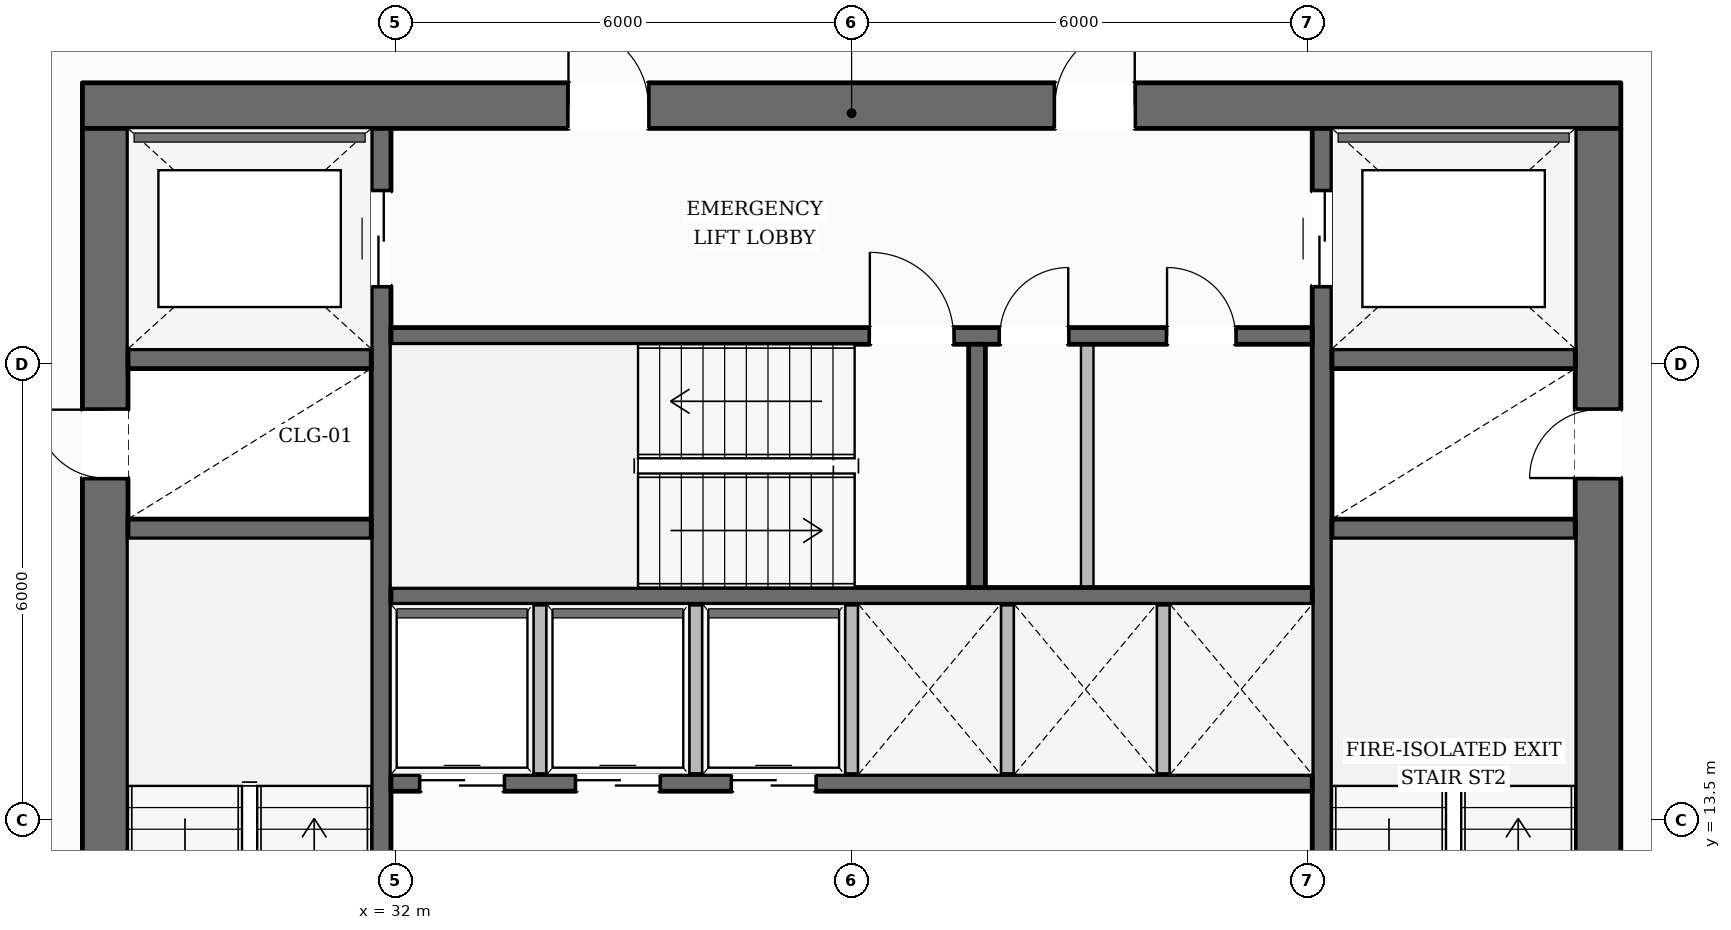
"""IFC4 building model, lengths in metres.
Left out: names, types, materials, properties, quantities, classifications, styles, units other than length and angle.
Written with IfcOpenShell. Run it as: python <this file> out.ifc"""

import sys

from ifc_helpers import new_model, si_unit, direction, frame, frame_2d, origin, place, context, subcontext, project, spatial, rectangle, extrude, element, fill, save


model = new_model("IFC4")
c1 = context("Model", 3, precision=1e-05, world=origin(), true_north=direction((0.0, 1.0)))
c2 = subcontext(c1, "Body", "Model", "MODEL_VIEW")
j1 = project(units=[si_unit("LENGTHUNIT", "METRE"), si_unit("PLANEANGLEUNIT", "RADIAN")], contexts=[c1])
p1 = place(None, origin())
s1 = spatial("IfcSite", under=j1, at=p1, CompositionType="ELEMENT")
p2 = place(p1, origin())
s2 = spatial("IfcBuilding", under=s1, at=p2, CompositionType="ELEMENT")
p3 = place(p2, frame((0.0, 0.0, 67.6)))
s3 = spatial("IfcBuildingStorey", under=s2, at=p3, CompositionType="ELEMENT", Elevation=67.6)
p4 = place(p3, frame((27.88, 22.9, 0.0), z_axis=(0.0, 0.0, 1.0), x_axis=(1.0, 0.0, 0.0)))
e1 = element("IfcWall", 1, at=p4, inside=s3, PredefinedType="SOLIDWALL", context=c2, shape_type="SweptSolid", body=[
    extrude(rectangle(XDim=20.24, YDim=0.6, at=frame_2d((10.12, 0.0))), origin(), (0.0, 0.0, 1.0), 3.59),
])
p5 = place(p4, frame((6.395, 0.0, 0.0)))
e2 = element("IfcOpeningElement", 2, at=p5, cuts=e1, PredefinedType="OPENING", context=c2, shape_type="SweptSolid", body=[
    extrude(rectangle(XDim=1.05, YDim=2.15, at=frame_2d((0.525, 1.075))), frame((0.0, 0.31, 0.0), z_axis=(0.0, -1.0, 0.0), x_axis=(1.0, 0.0, 0.0)), (0.0, 0.0, 1.0), 0.62),
])
p6 = place(p4, frame((12.795, 0.0, 0.0)))
e3 = element("IfcOpeningElement", 3, at=p6, cuts=e1, PredefinedType="OPENING", context=c2, shape_type="SweptSolid", body=[
    extrude(rectangle(XDim=1.05, YDim=2.15, at=frame_2d((0.525, 1.075))), frame((0.0, 0.31, 0.0), z_axis=(0.0, -1.0, 0.0), x_axis=(1.0, 0.0, 0.0)), (0.0, 0.0, 1.0), 0.62),
])
p7 = place(p3, frame((28.18, 9.6, 0.0), z_axis=(0.0, 0.0, 1.0), x_axis=(0.0, 1.0, 0.0)))
e4 = element("IfcWall", 4, at=p7, inside=s3, PredefinedType="SOLIDWALL", context=c2, shape_type="SweptSolid", body=[
    extrude(rectangle(XDim=13.0, YDim=0.6, at=frame_2d((6.5, 0.0))), origin(), (0.0, 0.0, 1.0), 3.59),
])
p8 = place(p7, frame((0.2, 0.0, 0.0)))
e5 = element("IfcOpeningElement", 5, at=p8, cuts=e4, PredefinedType="OPENING", context=c2, shape_type="SweptSolid", body=[
    extrude(rectangle(XDim=1.1, YDim=2.15, at=frame_2d((0.55, 1.075))), frame((0.0, 0.31, 0.0), z_axis=(0.0, -1.0, 0.0), x_axis=(1.0, 0.0, 0.0)), (0.0, 0.0, 1.0), 0.62),
])
p9 = place(p7, frame((8.4, 0.0, 0.0)))
e6 = element("IfcOpeningElement", 6, at=p9, cuts=e4, PredefinedType="OPENING", context=c2, shape_type="SweptSolid", body=[
    extrude(rectangle(XDim=0.9, YDim=2.1, at=frame_2d((0.45, 1.05))), frame((0.0, 0.31, 0.0), z_axis=(0.0, -1.0, 0.0), x_axis=(1.0, 0.0, 0.0)), (0.0, 0.0, 1.0), 0.62),
])
p10 = place(p3, frame((47.82, 9.6, 0.0), z_axis=(0.0, 0.0, 1.0), x_axis=(0.0, 1.0, 0.0)))
e7 = element("IfcWall", 7, at=p10, inside=s3, PredefinedType="SOLIDWALL", context=c2, shape_type="SweptSolid", body=[
    extrude(rectangle(XDim=13.0, YDim=0.6, at=frame_2d((6.5, 0.0))), origin(), (0.0, 0.0, 1.0), 3.59),
])
p11 = place(p10, frame((0.2, 0.0, 0.0)))
e8 = element("IfcOpeningElement", 8, at=p11, cuts=e7, PredefinedType="OPENING", context=c2, shape_type="SweptSolid", body=[
    extrude(rectangle(XDim=1.1, YDim=2.15, at=frame_2d((0.55, 1.075))), frame((0.0, 0.31, 0.0), z_axis=(0.0, -1.0, 0.0), x_axis=(1.0, 0.0, 0.0)), (0.0, 0.0, 1.0), 0.62),
])
p12 = place(p10, frame((8.4, 0.0, 0.0)))
e9 = element("IfcOpeningElement", 9, at=p12, cuts=e7, PredefinedType="OPENING", context=c2, shape_type="SweptSolid", body=[
    extrude(rectangle(XDim=0.9, YDim=2.1, at=frame_2d((0.45, 1.05))), frame((0.0, 0.31, 0.0), z_axis=(0.0, -1.0, 0.0), x_axis=(1.0, 0.0, 0.0)), (0.0, 0.0, 1.0), 0.62),
])
p13 = place(p3, frame((31.81, 9.6, 0.0), z_axis=(0.0, 0.0, 1.0), x_axis=(0.0, 1.0, 0.0)))
e10 = element("IfcWall", 10, at=p13, inside=s3, PredefinedType="SHEAR", context=c2, shape_type="SweptSolid", body=[
    extrude(rectangle(XDim=13.0, YDim=0.26, at=frame_2d((6.5, 0.0))), origin(), (0.0, 0.0, 1.0), 3.59),
])
p14 = place(p13, frame((10.925, 0.0, 0.0)))
e11 = element("IfcOpeningElement", 11, at=p14, cuts=e10, PredefinedType="OPENING", context=c2, shape_type="SweptSolid", body=[
    extrude(rectangle(XDim=1.25, YDim=2.25, at=frame_2d((0.625, 1.125))), frame((0.0, 0.14, 0.0), z_axis=(0.0, -1.0, 0.0), x_axis=(1.0, 0.0, 0.0)), (0.0, 0.0, 1.0), 0.28),
])
p15 = place(p3, frame((44.19, 9.6, 0.0), z_axis=(0.0, 0.0, 1.0), x_axis=(0.0, 1.0, 0.0)))
e12 = element("IfcWall", 12, at=p15, inside=s3, PredefinedType="SHEAR", context=c2, shape_type="SweptSolid", body=[
    extrude(rectangle(XDim=13.0, YDim=0.26, at=frame_2d((6.5, 0.0))), origin(), (0.0, 0.0, 1.0), 3.59),
])
p16 = place(p15, frame((10.925, 0.0, 0.0)))
e13 = element("IfcOpeningElement", 13, at=p16, cuts=e12, PredefinedType="OPENING", context=c2, shape_type="SweptSolid", body=[
    extrude(rectangle(XDim=1.25, YDim=2.25, at=frame_2d((0.625, 1.125))), frame((0.0, 0.14, 0.0), z_axis=(0.0, -1.0, 0.0), x_axis=(1.0, 0.0, 0.0)), (0.0, 0.0, 1.0), 0.28),
])
for number, where, z_axis, x_axis in (
    (14, (28.48, 17.33, 0.0), (0.0, 0.0, 1.0), (1.0, 0.0, 0.0)),
    (15, (28.48, 19.57, 0.0), (0.0, 0.0, 1.0), (1.0, 0.0, 0.0)),
    (16, (44.32, 17.33, 0.0), (0.0, 0.0, 1.0), (1.0, 0.0, 0.0)),
    (17, (44.32, 19.57, 0.0), (0.0, 0.0, 1.0), (1.0, 0.0, 0.0)),
):
    element("IfcWall", number, at=place(p3, frame(where, z_axis=z_axis, x_axis=x_axis)), inside=s3, PredefinedType="SHEAR", context=c2, shape_type="SweptSolid", body=[
        extrude(rectangle(XDim=3.2, YDim=0.26, at=frame_2d((1.6, 0.0))), origin(), (0.0, 0.0, 1.0), 3.59),
    ])
p17 = place(p3, frame((31.94, 19.87, 0.0), z_axis=(0.0, 0.0, 1.0), x_axis=(1.0, 0.0, 0.0)))
e18 = element("IfcWall", 18, at=p17, inside=s3, PredefinedType="SOLIDWALL", context=c2, shape_type="SweptSolid", body=[
    extrude(rectangle(XDim=12.12, YDim=0.22, at=frame_2d((6.06, 0.0))), origin(), (0.0, 0.0, 1.0), 3.59),
])
p18 = place(p17, frame((6.3, 0.0, 0.0)))
e19 = element("IfcOpeningElement", 19, at=p18, cuts=e18, PredefinedType="OPENING", context=c2, shape_type="SweptSolid", body=[
    extrude(rectangle(XDim=1.1, YDim=2.15, at=frame_2d((0.55, 1.075))), frame((0.0, 0.12, 0.0), z_axis=(0.0, -1.0, 0.0), x_axis=(1.0, 0.0, 0.0)), (0.0, 0.0, 1.0), 0.24),
])
p19 = place(p17, frame((8.01, 0.0, 0.0)))
e20 = element("IfcOpeningElement", 20, at=p19, cuts=e18, PredefinedType="OPENING", context=c2, shape_type="SweptSolid", body=[
    extrude(rectangle(XDim=0.9, YDim=2.1, at=frame_2d((0.45, 1.05))), frame((0.0, 0.12, 0.0), z_axis=(0.0, -1.0, 0.0), x_axis=(1.0, 0.0, 0.0)), (0.0, 0.0, 1.0), 0.24),
])
p20 = place(p17, frame((10.21, 0.0, 0.0)))
e21 = element("IfcOpeningElement", 21, at=p20, cuts=e18, PredefinedType="OPENING", context=c2, shape_type="SweptSolid", body=[
    extrude(rectangle(XDim=0.9, YDim=2.1, at=frame_2d((0.45, 1.05))), frame((0.0, 0.12, 0.0), z_axis=(0.0, -1.0, 0.0), x_axis=(1.0, 0.0, 0.0)), (0.0, 0.0, 1.0), 0.24),
])
p21 = place(p3, frame((31.94, 16.45, 0.0), z_axis=(0.0, 0.0, 1.0), x_axis=(1.0, 0.0, 0.0)))
e22 = element("IfcWall", 22, at=p21, inside=s3, PredefinedType="SOLIDWALL", context=c2, shape_type="SweptSolid", body=[
    extrude(rectangle(XDim=12.12, YDim=0.22, at=frame_2d((6.06, 0.0))), origin(), (0.0, 0.0, 1.0), 3.59),
])
p22 = place(p3, frame((39.65, 16.56, 0.0), z_axis=(0.0, 0.0, 1.0), x_axis=(0.0, 1.0, 0.0)))
e23 = element("IfcWall", 23, at=p22, inside=s3, PredefinedType="SOLIDWALL", context=c2, shape_type="SweptSolid", body=[
    extrude(rectangle(XDim=3.2, YDim=0.22, at=frame_2d((1.6, 0.0))), origin(), (0.0, 0.0, 1.0), 3.59),
])
p23 = place(p3, frame((31.94, 13.99, 0.0), z_axis=(0.0, 0.0, 1.0), x_axis=(1.0, 0.0, 0.0)))
e24 = element("IfcWall", 24, at=p23, inside=s3, PredefinedType="SOLIDWALL", context=c2, shape_type="SweptSolid", body=[
    extrude(rectangle(XDim=12.12, YDim=0.22, at=frame_2d((6.06, 0.0))), origin(), (0.0, 0.0, 1.0), 3.59),
])
p24 = place(p23, frame((0.385, 0.0, 0.0)))
e25 = element("IfcOpeningElement", 25, at=p24, cuts=e24, PredefinedType="OPENING", context=c2, shape_type="SweptSolid", body=[
    extrude(rectangle(XDim=1.1, YDim=2.2, at=frame_2d((0.55, 1.1))), frame((0.0, 0.12, 0.0), z_axis=(0.0, -1.0, 0.0), x_axis=(1.0, 0.0, 0.0)), (0.0, 0.0, 1.0), 0.24),
])
p25 = place(p23, frame((2.435, 0.0, 0.0)))
e26 = element("IfcOpeningElement", 26, at=p25, cuts=e24, PredefinedType="OPENING", context=c2, shape_type="SweptSolid", body=[
    extrude(rectangle(XDim=1.1, YDim=2.2, at=frame_2d((0.55, 1.1))), frame((0.0, 0.12, 0.0), z_axis=(0.0, -1.0, 0.0), x_axis=(1.0, 0.0, 0.0)), (0.0, 0.0, 1.0), 0.24),
])
p26 = place(p23, frame((4.485, 0.0, 0.0)))
e27 = element("IfcOpeningElement", 27, at=p26, cuts=e24, PredefinedType="OPENING", context=c2, shape_type="SweptSolid", body=[
    extrude(rectangle(XDim=1.1, YDim=2.2, at=frame_2d((0.55, 1.1))), frame((0.0, 0.12, 0.0), z_axis=(0.0, -1.0, 0.0), x_axis=(1.0, 0.0, 0.0)), (0.0, 0.0, 1.0), 0.24),
])
p27 = place(p3, frame((12.513, 13.357, 0.0), z_axis=(0.0, 0.0, 1.0), x_axis=(0.505335851503, 0.862922752734, 0.0)))
e28 = element("IfcWall", 28, at=p27, inside=s3, PredefinedType="STANDARD", context=c2, shape_type="SweptSolid", body=[
    extrude(rectangle(XDim=36.293, YDim=0.38, at=frame_2d((18.147, 0.0))), origin(), (0.0, 0.0, 1.0), 2.97),
])
p28 = place(p27, frame((32.05, 0.0, 0.65)))
e29 = element("IfcOpeningElement", 29, at=p28, cuts=e28, PredefinedType="OPENING", context=c2, shape_type="SweptSolid", body=[
    extrude(rectangle(XDim=1.65, YDim=1.75, at=frame_2d((0.825, 0.875))), frame((0.0, 0.2, 0.0), z_axis=(0.0, -1.0, 0.0), x_axis=(1.0, 0.0, 0.0)), (0.0, 0.0, 1.0), 0.4),
])
p29 = place(p27, frame((26.159, 0.0, 0.65)))
e30 = element("IfcOpeningElement", 30, at=p29, cuts=e28, PredefinedType="OPENING", context=c2, shape_type="SweptSolid", body=[
    extrude(rectangle(XDim=1.65, YDim=1.75, at=frame_2d((0.825, 0.875))), frame((0.0, 0.2, 0.0), z_axis=(0.0, -1.0, 0.0), x_axis=(1.0, 0.0, 0.0)), (0.0, 0.0, 1.0), 0.4),
])
p30 = place(p27, frame((8.49, 0.0, 0.65)))
e31 = element("IfcOpeningElement", 31, at=p30, cuts=e28, PredefinedType="OPENING", context=c2, shape_type="SweptSolid", body=[
    extrude(rectangle(XDim=1.65, YDim=1.75, at=frame_2d((0.825, 0.875))), frame((0.0, 0.2, 0.0), z_axis=(0.0, -1.0, 0.0), x_axis=(1.0, 0.0, 0.0)), (0.0, 0.0, 1.0), 0.4),
])
p31 = place(p27, frame((2.6, 0.0, 0.65)))
e32 = element("IfcOpeningElement", 32, at=p31, cuts=e28, PredefinedType="OPENING", context=c2, shape_type="SweptSolid", body=[
    extrude(rectangle(XDim=1.65, YDim=1.75, at=frame_2d((0.825, 0.875))), frame((0.0, 0.2, 0.0), z_axis=(0.0, -1.0, 0.0), x_axis=(1.0, 0.0, 0.0)), (0.0, 0.0, 1.0), 0.4),
])
p32 = place(p3, frame((45.032, 44.743, 0.0), z_axis=(0.0, 0.0, 1.0), x_axis=(0.501444024373, -0.865190089183, 0.0)))
e33 = element("IfcWall", 33, at=p32, inside=s3, PredefinedType="STANDARD", context=c2, shape_type="SweptSolid", body=[
    extrude(rectangle(XDim=36.012, YDim=0.38, at=frame_2d((18.006, 0.0))), origin(), (0.0, 0.0, 1.0), 2.97),
])
p33 = place(p32, frame((31.786, 0.0, 0.65)))
e34 = element("IfcOpeningElement", 34, at=p33, cuts=e33, PredefinedType="OPENING", context=c2, shape_type="SweptSolid", body=[
    extrude(rectangle(XDim=1.65, YDim=1.75, at=frame_2d((0.825, 0.875))), frame((0.0, 0.2, 0.0), z_axis=(0.0, -1.0, 0.0), x_axis=(1.0, 0.0, 0.0)), (0.0, 0.0, 1.0), 0.4),
])
p34 = place(p32, frame((25.944, 0.0, 0.65)))
e35 = element("IfcOpeningElement", 35, at=p34, cuts=e33, PredefinedType="OPENING", context=c2, shape_type="SweptSolid", body=[
    extrude(rectangle(XDim=1.65, YDim=1.75, at=frame_2d((0.825, 0.875))), frame((0.0, 0.2, 0.0), z_axis=(0.0, -1.0, 0.0), x_axis=(1.0, 0.0, 0.0)), (0.0, 0.0, 1.0), 0.4),
])
p35 = place(p32, frame((14.259, 0.0, 0.65)))
e36 = element("IfcOpeningElement", 36, at=p35, cuts=e33, PredefinedType="OPENING", context=c2, shape_type="SweptSolid", body=[
    extrude(rectangle(XDim=1.65, YDim=1.75, at=frame_2d((0.825, 0.875))), frame((0.0, 0.2, 0.0), z_axis=(0.0, -1.0, 0.0), x_axis=(1.0, 0.0, 0.0)), (0.0, 0.0, 1.0), 0.4),
])
p36 = place(p32, frame((8.417, 0.0, 0.65)))
e37 = element("IfcOpeningElement", 37, at=p36, cuts=e33, PredefinedType="OPENING", context=c2, shape_type="SweptSolid", body=[
    extrude(rectangle(XDim=1.65, YDim=1.75, at=frame_2d((0.825, 0.875))), frame((0.0, 0.2, 0.0), z_axis=(0.0, -1.0, 0.0), x_axis=(1.0, 0.0, 0.0)), (0.0, 0.0, 1.0), 0.4),
])
p37 = place(p32, frame((2.574, 0.0, 0.65)))
e38 = element("IfcOpeningElement", 38, at=p37, cuts=e33, PredefinedType="OPENING", context=c2, shape_type="SweptSolid", body=[
    extrude(rectangle(XDim=1.65, YDim=1.75, at=frame_2d((0.825, 0.875))), frame((0.0, 0.2, 0.0), z_axis=(0.0, -1.0, 0.0), x_axis=(1.0, 0.0, 0.0)), (0.0, 0.0, 1.0), 0.4),
])
for number, where, z_axis, x_axis in (
    (39, (33.9, 14.1, 0.0), (0.0, 0.0, 1.0), (0.0, 1.0, 0.0)),
    (40, (35.95, 14.1, 0.0), (0.0, 0.0, 1.0), (0.0, 1.0, 0.0)),
    (41, (38.0, 14.1, 0.0), (0.0, 0.0, 1.0), (0.0, 1.0, 0.0)),
    (42, (40.05, 14.1, 0.0), (0.0, 0.0, 1.0), (0.0, 1.0, 0.0)),
    (43, (42.1, 14.1, 0.0), (0.0, 0.0, 1.0), (0.0, 1.0, 0.0)),
):
    element("IfcWall", number, at=place(p3, frame(where, z_axis=z_axis, x_axis=x_axis)), inside=s3, PredefinedType="PARTITIONING", context=c2, shape_type="SweptSolid", body=[
        extrude(rectangle(XDim=2.24, YDim=0.165, at=frame_2d((1.12, 0.0))), origin(), (0.0, 0.0, 1.0), 3.59),
    ])
p38 = place(p3, frame((41.1, 16.56, 0.0), z_axis=(0.0, 0.0, 1.0), x_axis=(0.0, 1.0, 0.0)))
e44 = element("IfcWall", 44, at=p38, inside=s3, PredefinedType="PARTITIONING", context=c2, shape_type="SweptSolid", body=[
    extrude(rectangle(XDim=3.2, YDim=0.165, at=frame_2d((1.6, 0.0))), origin(), (0.0, 0.0, 1.0), 3.59),
])
p39 = place(p18, origin())
e45 = element("IfcDoor", 45, at=p39, inside=s3, OperationType="SINGLE_SWING_LEFT", PredefinedType="DOOR", context=c2, shape_type="SweptSolid", body=[
    extrude(rectangle(XDim=1.1, YDim=2.15, at=frame_2d((0.55, 1.075))), frame((0.0, 0.025, 0.0), z_axis=(0.0, -1.0, 0.0), x_axis=(1.0, 0.0, 0.0)), (0.0, 0.0, 1.0), 0.05),
])
fill(e19, e45)
p40 = place(p9, origin())
e46 = element("IfcDoor", 46, at=p40, inside=s3, OperationType="SINGLE_SWING_RIGHT", PredefinedType="DOOR", context=c2, shape_type="SweptSolid", body=[
    extrude(rectangle(XDim=0.9, YDim=2.1, at=frame_2d((0.45, 1.05))), frame((0.0, 0.025, 0.0), z_axis=(0.0, -1.0, 0.0), x_axis=(1.0, 0.0, 0.0)), (0.0, 0.0, 1.0), 0.05),
])
fill(e6, e46)
p41 = place(p12, origin())
e47 = element("IfcDoor", 47, at=p41, inside=s3, OperationType="SINGLE_SWING_LEFT", PredefinedType="DOOR", context=c2, shape_type="SweptSolid", body=[
    extrude(rectangle(XDim=0.9, YDim=2.1, at=frame_2d((0.45, 1.05))), frame((0.0, 0.025, 0.0), z_axis=(0.0, -1.0, 0.0), x_axis=(1.0, 0.0, 0.0)), (0.0, 0.0, 1.0), 0.05),
])
fill(e9, e47)
p42 = place(p5, origin())
e48 = element("IfcDoor", 48, at=p42, inside=s3, OperationType="SINGLE_SWING_LEFT", PredefinedType="DOOR", context=c2, shape_type="SweptSolid", body=[
    extrude(rectangle(XDim=1.05, YDim=2.15, at=frame_2d((0.525, 1.075))), frame((0.0, 0.025, 0.0), z_axis=(0.0, -1.0, 0.0), x_axis=(1.0, 0.0, 0.0)), (0.0, 0.0, 1.0), 0.05),
])
fill(e2, e48)
p43 = place(p6, origin())
e49 = element("IfcDoor", 49, at=p43, inside=s3, OperationType="SINGLE_SWING_RIGHT", PredefinedType="DOOR", context=c2, shape_type="SweptSolid", body=[
    extrude(rectangle(XDim=1.05, YDim=2.15, at=frame_2d((0.525, 1.075))), frame((0.0, 0.025, 0.0), z_axis=(0.0, -1.0, 0.0), x_axis=(1.0, 0.0, 0.0)), (0.0, 0.0, 1.0), 0.05),
])
fill(e3, e49)
p44 = place(p14, origin())
e50 = element("IfcDoor", 50, at=p44, inside=s3, OperationType="DOUBLE_DOOR_SLIDING", PredefinedType="DOOR", context=c2, shape_type="SweptSolid", body=[
    extrude(rectangle(XDim=1.25, YDim=2.25, at=frame_2d((0.625, 1.125))), frame((0.0, 0.025, 0.0), z_axis=(0.0, -1.0, 0.0), x_axis=(1.0, 0.0, 0.0)), (0.0, 0.0, 1.0), 0.05),
])
fill(e11, e50)
p45 = place(p16, origin())
e51 = element("IfcDoor", 51, at=p45, inside=s3, OperationType="DOUBLE_DOOR_SLIDING", PredefinedType="DOOR", context=c2, shape_type="SweptSolid", body=[
    extrude(rectangle(XDim=1.25, YDim=2.25, at=frame_2d((0.625, 1.125))), frame((0.0, 0.025, 0.0), z_axis=(0.0, -1.0, 0.0), x_axis=(1.0, 0.0, 0.0)), (0.0, 0.0, 1.0), 0.05),
])
fill(e13, e51)
p46 = place(p24, origin())
e52 = element("IfcDoor", 52, at=p46, inside=s3, OperationType="DOUBLE_DOOR_SLIDING", PredefinedType="DOOR", context=c2, shape_type="SweptSolid", body=[
    extrude(rectangle(XDim=1.1, YDim=2.2, at=frame_2d((0.55, 1.1))), frame((0.0, 0.025, 0.0), z_axis=(0.0, -1.0, 0.0), x_axis=(1.0, 0.0, 0.0)), (0.0, 0.0, 1.0), 0.05),
])
fill(e25, e52)
p47 = place(p25, origin())
e53 = element("IfcDoor", 53, at=p47, inside=s3, OperationType="DOUBLE_DOOR_SLIDING", PredefinedType="DOOR", context=c2, shape_type="SweptSolid", body=[
    extrude(rectangle(XDim=1.1, YDim=2.2, at=frame_2d((0.55, 1.1))), frame((0.0, 0.025, 0.0), z_axis=(0.0, -1.0, 0.0), x_axis=(1.0, 0.0, 0.0)), (0.0, 0.0, 1.0), 0.05),
])
fill(e26, e53)
p48 = place(p26, origin())
e54 = element("IfcDoor", 54, at=p48, inside=s3, OperationType="DOUBLE_DOOR_SLIDING", PredefinedType="DOOR", context=c2, shape_type="SweptSolid", body=[
    extrude(rectangle(XDim=1.1, YDim=2.2, at=frame_2d((0.55, 1.1))), frame((0.0, 0.025, 0.0), z_axis=(0.0, -1.0, 0.0), x_axis=(1.0, 0.0, 0.0)), (0.0, 0.0, 1.0), 0.05),
])
fill(e27, e54)
p49 = place(p19, origin())
e55 = element("IfcDoor", 55, at=p49, inside=s3, OperationType="SINGLE_SWING_RIGHT", PredefinedType="DOOR", context=c2, shape_type="SweptSolid", body=[
    extrude(rectangle(XDim=0.9, YDim=2.1, at=frame_2d((0.45, 1.05))), frame((0.0, 0.025, 0.0), z_axis=(0.0, -1.0, 0.0), x_axis=(1.0, 0.0, 0.0)), (0.0, 0.0, 1.0), 0.05),
])
fill(e20, e55)
p50 = place(p20, origin())
e56 = element("IfcDoor", 56, at=p50, inside=s3, OperationType="SINGLE_SWING_LEFT", PredefinedType="DOOR", context=c2, shape_type="SweptSolid", body=[
    extrude(rectangle(XDim=0.9, YDim=2.1, at=frame_2d((0.45, 1.05))), frame((0.0, 0.025, 0.0), z_axis=(0.0, -1.0, 0.0), x_axis=(1.0, 0.0, 0.0)), (0.0, 0.0, 1.0), 0.05),
])
fill(e21, e56)
save(model, sys.argv[1])
